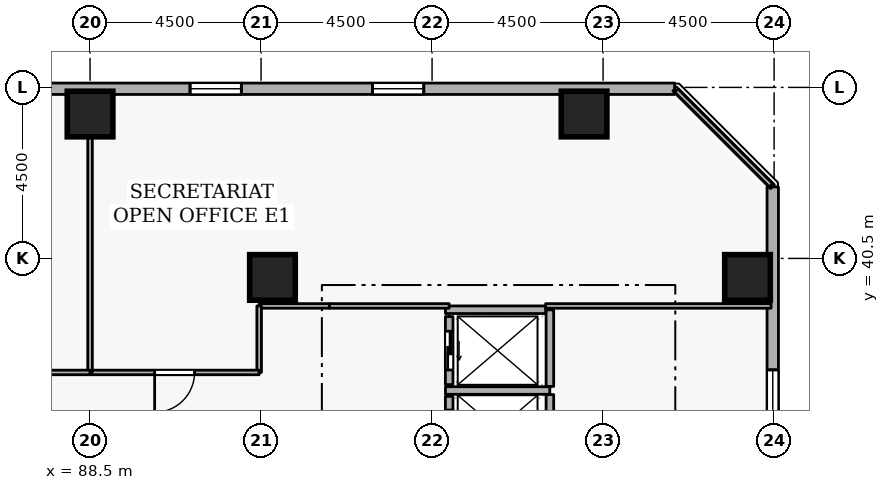
"""IFC4 building model, lengths in metres.
Left out: names, types, materials, properties, quantities, classifications, styles, units other than length and angle.
Written with IfcOpenShell. Run it as: python <this file> out.ifc"""

import sys

from ifc_helpers import new_model, si_unit, direction, frame, frame_2d, origin, origin_2d, place, context, subcontext, project, spatial, rectangle, extrude, element, fill, save


model = new_model("IFC4")
c1 = context("Model", 3, precision=1e-05, world=origin(), true_north=direction((0.0, 1.0)))
c2 = subcontext(c1, "Body", "Model", "MODEL_VIEW")
j1 = project(units=[si_unit("LENGTHUNIT", "METRE"), si_unit("PLANEANGLEUNIT", "RADIAN")], contexts=[c1])
p1 = place(None, origin())
s1 = spatial("IfcSite", under=j1, at=p1, CompositionType="ELEMENT")
p2 = place(p1, origin())
s2 = spatial("IfcBuilding", under=s1, at=p2, CompositionType="ELEMENT")
p3 = place(p2, frame((0.0, 0.0, 116.1)))
s3 = spatial("IfcBuildingStorey", under=s2, at=p3, CompositionType="ELEMENT", Elevation=116.1)
for number, where, z_axis, x_axis in (
    (1, (105.8, 40.0, 0.0), (0.0, 0.0, 1.0), (1.0, 0.0, 0.0)),
    (2, (101.5, 44.3, 0.0), (0.0, 0.0, 1.0), (1.0, 0.0, 0.0)),
    (3, (88.5, 44.3, 0.0), (0.0, 0.0, 1.0), (1.0, 0.0, 0.0)),
    (4, (93.3, 40.0, 0.0), (0.0, 0.0, 1.0), (1.0, 0.0, 0.0)),
):
    element("IfcColumn", number, at=place(p3, frame(where, z_axis=z_axis, x_axis=x_axis)), inside=s3, PredefinedType="COLUMN", context=c2, shape_type="SweptSolid", body=[
        extrude(rectangle(XDim=1.2, YDim=1.2, at=origin_2d()), origin(), (0.0, 0.0, 1.0), 3.6),
    ])
p4 = place(p3, frame((106.465, 5.619, 0.0), z_axis=(0.0, 0.0, 1.0), x_axis=(0.0, 1.0, 0.0)))
e5 = element("IfcWall", 5, at=p4, inside=s3, PredefinedType="STANDARD", context=c2, shape_type="SweptSolid", body=[
    extrude(rectangle(XDim=36.763, YDim=0.3, at=frame_2d((18.381, 0.0))), origin(), (0.0, 0.0, 1.0), 2.22),
])
p5 = place(p4, frame((1.8, 0.0, 0.72)))
e6 = element("IfcOpeningElement", 6, at=p5, cuts=e5, PredefinedType="OPENING", context=c2, shape_type="SweptSolid", body=[
    extrude(rectangle(XDim=1.35, YDim=1.05, at=frame_2d((0.675, 0.525))), frame((0.0, 0.16, 0.0), z_axis=(0.0, -1.0, 0.0), x_axis=(1.0, 0.0, 0.0)), (0.0, 0.0, 1.0), 0.32),
])
p6 = place(p4, frame((11.4, 0.0, 0.72)))
e7 = element("IfcOpeningElement", 7, at=p6, cuts=e5, PredefinedType="OPENING", context=c2, shape_type="SweptSolid", body=[
    extrude(rectangle(XDim=1.35, YDim=1.05, at=frame_2d((0.675, 0.525))), frame((0.0, 0.16, 0.0), z_axis=(0.0, -1.0, 0.0), x_axis=(1.0, 0.0, 0.0)), (0.0, 0.0, 1.0), 0.32),
])
p7 = place(p4, frame((16.2, 0.0, 0.72)))
e8 = element("IfcOpeningElement", 8, at=p7, cuts=e5, PredefinedType="OPENING", context=c2, shape_type="SweptSolid", body=[
    extrude(rectangle(XDim=1.35, YDim=1.05, at=frame_2d((0.675, 0.525))), frame((0.0, 0.16, 0.0), z_axis=(0.0, -1.0, 0.0), x_axis=(1.0, 0.0, 0.0)), (0.0, 0.0, 1.0), 0.32),
])
p8 = place(p4, frame((25.8, 0.0, 0.72)))
e9 = element("IfcOpeningElement", 9, at=p8, cuts=e5, PredefinedType="OPENING", context=c2, shape_type="SweptSolid", body=[
    extrude(rectangle(XDim=1.35, YDim=1.05, at=frame_2d((0.675, 0.525))), frame((0.0, 0.16, 0.0), z_axis=(0.0, -1.0, 0.0), x_axis=(1.0, 0.0, 0.0)), (0.0, 0.0, 1.0), 0.32),
])
p9 = place(p4, frame((30.6, 0.0, 0.72)))
e10 = element("IfcOpeningElement", 10, at=p9, cuts=e5, PredefinedType="OPENING", context=c2, shape_type="SweptSolid", body=[
    extrude(rectangle(XDim=1.35, YDim=1.05, at=frame_2d((0.675, 0.525))), frame((0.0, 0.16, 0.0), z_axis=(0.0, -1.0, 0.0), x_axis=(1.0, 0.0, 0.0)), (0.0, 0.0, 1.0), 0.32),
])
p10 = place(p3, frame((103.881, 44.965, 0.0), z_axis=(0.0, 0.0, 1.0), x_axis=(-1.0, 0.0, 0.0)))
e11 = element("IfcWall", 11, at=p10, inside=s3, PredefinedType="STANDARD", context=c2, shape_type="SweptSolid", body=[
    extrude(rectangle(XDim=36.763, YDim=0.3, at=frame_2d((18.381, 0.0))), origin(), (0.0, 0.0, 1.0), 2.22),
])
p11 = place(p10, frame((6.6, 0.0, 0.72)))
e12 = element("IfcOpeningElement", 12, at=p11, cuts=e11, PredefinedType="OPENING", context=c2, shape_type="SweptSolid", body=[
    extrude(rectangle(XDim=1.35, YDim=1.05, at=frame_2d((0.675, 0.525))), frame((0.0, 0.16, 0.0), z_axis=(0.0, -1.0, 0.0), x_axis=(1.0, 0.0, 0.0)), (0.0, 0.0, 1.0), 0.32),
])
p12 = place(p10, frame((11.4, 0.0, 0.72)))
e13 = element("IfcOpeningElement", 13, at=p12, cuts=e11, PredefinedType="OPENING", context=c2, shape_type="SweptSolid", body=[
    extrude(rectangle(XDim=1.35, YDim=1.05, at=frame_2d((0.675, 0.525))), frame((0.0, 0.16, 0.0), z_axis=(0.0, -1.0, 0.0), x_axis=(1.0, 0.0, 0.0)), (0.0, 0.0, 1.0), 0.32),
])
p13 = place(p10, frame((21.0, 0.0, 0.72)))
e14 = element("IfcOpeningElement", 14, at=p13, cuts=e11, PredefinedType="OPENING", context=c2, shape_type="SweptSolid", body=[
    extrude(rectangle(XDim=1.35, YDim=1.05, at=frame_2d((0.675, 0.525))), frame((0.0, 0.16, 0.0), z_axis=(0.0, -1.0, 0.0), x_axis=(1.0, 0.0, 0.0)), (0.0, 0.0, 1.0), 0.32),
])
p14 = place(p10, frame((25.8, 0.0, 0.72)))
e15 = element("IfcOpeningElement", 15, at=p14, cuts=e11, PredefinedType="OPENING", context=c2, shape_type="SweptSolid", body=[
    extrude(rectangle(XDim=1.35, YDim=1.05, at=frame_2d((0.675, 0.525))), frame((0.0, 0.16, 0.0), z_axis=(0.0, -1.0, 0.0), x_axis=(1.0, 0.0, 0.0)), (0.0, 0.0, 1.0), 0.32),
])
p15 = place(p3, frame((97.95, 36.87, 0.0), z_axis=(0.0, 0.0, 1.0), x_axis=(0.0, -1.0, 0.0)))
e16 = element("IfcWall", 16, at=p15, inside=s3, PredefinedType="STANDARD", context=c2, shape_type="SweptSolid", body=[
    extrude(rectangle(XDim=1.74, YDim=0.2, at=frame_2d((0.87, 0.0))), origin(), (0.0, 0.0, 1.0), 3.32),
])
p16 = place(p15, frame((0.36, 0.0, 0.0)))
e17 = element("IfcOpeningElement", 17, at=p16, cuts=e16, PredefinedType="OPENING", context=c2, shape_type="SweptSolid", body=[
    extrude(rectangle(XDim=1.02, YDim=2.06, at=frame_2d((0.51, 1.03))), frame((0.0, 0.11, 0.0), z_axis=(0.0, -1.0, 0.0), x_axis=(1.0, 0.0, 0.0)), (0.0, 0.0, 1.0), 0.22),
])
p17 = place(p3, frame((97.95, 38.97, 0.0), z_axis=(0.0, 0.0, 1.0), x_axis=(0.0, -1.0, 0.0)))
e18 = element("IfcWall", 18, at=p17, inside=s3, PredefinedType="STANDARD", context=c2, shape_type="SweptSolid", body=[
    extrude(rectangle(XDim=1.79, YDim=0.2, at=frame_2d((0.895, 0.0))), origin(), (0.0, 0.0, 1.0), 3.32),
])
p18 = place(p17, frame((0.385, 0.0, 0.0)))
e19 = element("IfcOpeningElement", 19, at=p18, cuts=e18, PredefinedType="OPENING", context=c2, shape_type="SweptSolid", body=[
    extrude(rectangle(XDim=1.02, YDim=2.06, at=frame_2d((0.51, 1.03))), frame((0.0, 0.11, 0.0), z_axis=(0.0, -1.0, 0.0), x_axis=(1.0, 0.0, 0.0)), (0.0, 0.0, 1.0), 0.22),
])
p19 = place(p3, frame((97.852, 37.025, 0.0), z_axis=(0.0, 0.0, 1.0), x_axis=(1.0, 0.0, 0.0)))
e20 = element("IfcWall", 20, at=p19, inside=s3, PredefinedType="STANDARD", context=c2, shape_type="SweptSolid", body=[
    extrude(rectangle(XDim=2.746, YDim=0.2, at=frame_2d((1.373, 0.0))), origin(), (0.0, 0.0, 1.0), 3.32),
])
p20 = place(p3, frame((100.6, 35.062, 0.0), z_axis=(0.0, 0.0, 1.0), x_axis=(0.0, 1.0, 0.0)))
e21 = element("IfcWall", 21, at=p20, inside=s3, PredefinedType="STANDARD", context=c2, shape_type="SweptSolid", body=[
    extrude(rectangle(XDim=1.856, YDim=0.2, at=frame_2d((0.928, 0.0))), origin(), (0.0, 0.0, 1.0), 3.32),
])
p21 = place(p3, frame((100.6, 37.132, 0.0), z_axis=(0.0, 0.0, 1.0), x_axis=(0.0, 1.0, 0.0)))
e22 = element("IfcWall", 22, at=p21, inside=s3, PredefinedType="STANDARD", context=c2, shape_type="SweptSolid", body=[
    extrude(rectangle(XDim=2.016, YDim=0.2, at=frame_2d((1.008, 0.0))), origin(), (0.0, 0.0, 1.0), 3.32),
])
p22 = place(p3, frame((97.852, 39.15, 0.0), z_axis=(0.0, 0.0, 1.0), x_axis=(1.0, 0.0, 0.0)))
e23 = element("IfcWall", 23, at=p22, inside=s3, PredefinedType="STANDARD", context=c2, shape_type="SweptSolid", body=[
    extrude(rectangle(XDim=2.636, YDim=0.2, at=frame_2d((1.318, 0.0))), origin(), (0.0, 0.0, 1.0), 3.32),
])
p23 = place(p3, frame((106.42, 39.25, 0.0), z_axis=(0.0, 0.0, 1.0), x_axis=(-1.0, 0.0, 0.0)))
e24 = element("IfcWall", 24, at=p23, inside=s3, PredefinedType="PARTITIONING", context=c2, shape_type="SweptSolid", body=[
    extrude(rectangle(XDim=5.932, YDim=0.12, at=frame_2d((2.966, 0.0))), origin(), (0.0, 0.0, 1.0), 3.32),
])
p24 = place(p3, frame((97.95, 39.25, 0.0), z_axis=(0.0, 0.0, 1.0), x_axis=(-1.0, 0.0, 0.0)))
e25 = element("IfcWall", 25, at=p24, inside=s3, PredefinedType="PARTITIONING", context=c2, shape_type="SweptSolid", body=[
    extrude(rectangle(XDim=3.15, YDim=0.12, at=frame_2d((1.575, 0.0))), origin(), (0.0, 0.0, 1.0), 3.32),
])
p25 = place(p3, frame((94.8, 39.25, 0.0), z_axis=(0.0, 0.0, 1.0), x_axis=(-1.0, 0.0, 0.0)))
e26 = element("IfcWall", 26, at=p25, inside=s3, PredefinedType="PARTITIONING", context=c2, shape_type="SweptSolid", body=[
    extrude(rectangle(XDim=1.85, YDim=0.12, at=frame_2d((0.925, 0.0))), origin(), (0.0, 0.0, 1.0), 3.32),
])
p26 = place(p3, frame((92.95, 39.25, 0.0), z_axis=(0.0, 0.0, 1.0), x_axis=(0.0, -1.0, 0.0)))
e27 = element("IfcWall", 27, at=p26, inside=s3, PredefinedType="PARTITIONING", context=c2, shape_type="SweptSolid", body=[
    extrude(rectangle(XDim=1.75, YDim=0.12, at=frame_2d((0.875, 0.0))), origin(), (0.0, 0.0, 1.0), 3.32),
])
p27 = place(p3, frame((92.95, 37.5, 0.0), z_axis=(0.0, 0.0, 1.0), x_axis=(-1.0, 0.0, 0.0)))
e28 = element("IfcWall", 28, at=p27, inside=s3, PredefinedType="PARTITIONING", context=c2, shape_type="SweptSolid", body=[
    extrude(rectangle(XDim=4.45, YDim=0.12, at=frame_2d((2.225, 0.0))), origin(), (0.0, 0.0, 1.0), 3.32),
])
p28 = place(p27, frame((1.7, 0.0, 0.0)))
e29 = element("IfcOpeningElement", 29, at=p28, cuts=e28, PredefinedType="OPENING", context=c2, shape_type="SweptSolid", body=[
    extrude(rectangle(XDim=1.05, YDim=2.1, at=frame_2d((0.525, 1.05))), frame((0.0, 0.07, 0.0), z_axis=(0.0, -1.0, 0.0), x_axis=(1.0, 0.0, 0.0)), (0.0, 0.0, 1.0), 0.14),
])
p29 = place(p3, frame((88.5, 37.5, 0.0), z_axis=(0.0, 0.0, 1.0), x_axis=(0.0, 1.0, 0.0)))
e30 = element("IfcWall", 30, at=p29, inside=s3, PredefinedType="PARTITIONING", context=c2, shape_type="SweptSolid", body=[
    extrude(rectangle(XDim=7.42, YDim=0.12, at=frame_2d((3.71, 0.0))), origin(), (0.0, 0.0, 1.0), 2.862),
])
p30 = place(p3, frame((103.925, 44.92, 0.0), z_axis=(0.0, 0.0, 1.0), x_axis=(0.707106781187, -0.707106781187, 0.0)))
e31 = element("IfcWall", 31, at=p30, inside=s3, PredefinedType="PARTITIONING", context=c2, shape_type="SweptSolid", body=[
    extrude(rectangle(XDim=3.528, YDim=0.12, at=frame_2d((1.764, 0.0))), origin(), (0.0, 0.0, 1.0), 3.32),
])
p31 = place(p3, frame((88.5, 37.5, 0.0), z_axis=(0.0, 0.0, 1.0), x_axis=(-1.0, 0.0, 0.0)))
e32 = element("IfcWall", 32, at=p31, inside=s3, PredefinedType="PARTITIONING", context=c2, shape_type="SweptSolid", body=[
    extrude(rectangle(XDim=3.15, YDim=0.12, at=frame_2d((1.575, 0.0))), origin(), (0.0, 0.0, 1.0), 3.32),
])
p32 = place(p31, frame((1.1, 0.0, 0.0)))
e33 = element("IfcOpeningElement", 33, at=p32, cuts=e32, PredefinedType="OPENING", context=c2, shape_type="SweptSolid", body=[
    extrude(rectangle(XDim=0.95, YDim=2.1, at=frame_2d((0.475, 1.05))), frame((0.0, 0.07, 0.0), z_axis=(0.0, -1.0, 0.0), x_axis=(1.0, 0.0, 0.0)), (0.0, 0.0, 1.0), 0.14),
])
p33 = place(p9, origin())
e34 = element("IfcWindow", 34, at=p33, inside=s3, PartitioningType="SINGLE_PANEL", PredefinedType="WINDOW", context=c2, shape_type="SweptSolid", body=[
    extrude(rectangle(XDim=1.35, YDim=1.05, at=frame_2d((0.675, 0.525))), frame((0.0, 0.03, 0.0), z_axis=(0.0, -1.0, 0.0), x_axis=(1.0, 0.0, 0.0)), (0.0, 0.0, 1.0), 0.06),
])
fill(e10, e34)
p34 = place(p11, origin())
e35 = element("IfcWindow", 35, at=p34, inside=s3, PartitioningType="SINGLE_PANEL", PredefinedType="WINDOW", context=c2, shape_type="SweptSolid", body=[
    extrude(rectangle(XDim=1.35, YDim=1.05, at=frame_2d((0.675, 0.525))), frame((0.0, 0.03, 0.0), z_axis=(0.0, -1.0, 0.0), x_axis=(1.0, 0.0, 0.0)), (0.0, 0.0, 1.0), 0.06),
])
fill(e12, e35)
p35 = place(p12, origin())
e36 = element("IfcWindow", 36, at=p35, inside=s3, PartitioningType="SINGLE_PANEL", PredefinedType="WINDOW", context=c2, shape_type="SweptSolid", body=[
    extrude(rectangle(XDim=1.35, YDim=1.05, at=frame_2d((0.675, 0.525))), frame((0.0, 0.03, 0.0), z_axis=(0.0, -1.0, 0.0), x_axis=(1.0, 0.0, 0.0)), (0.0, 0.0, 1.0), 0.06),
])
fill(e13, e36)
p36 = place(p16, origin())
e37 = element("IfcDoor", 37, at=p36, inside=s3, OperationType="SLIDING_TO_LEFT", PredefinedType="DOOR", context=c2, shape_type="SweptSolid", body=[
    extrude(rectangle(XDim=1.02, YDim=2.06, at=frame_2d((0.51, 1.03))), frame((0.0, 0.025, 0.0), z_axis=(0.0, -1.0, 0.0), x_axis=(1.0, 0.0, 0.0)), (0.0, 0.0, 1.0), 0.05),
])
fill(e17, e37)
p37 = place(p18, origin())
e38 = element("IfcDoor", 38, at=p37, inside=s3, OperationType="SLIDING_TO_LEFT", PredefinedType="DOOR", context=c2, shape_type="SweptSolid", body=[
    extrude(rectangle(XDim=1.02, YDim=2.06, at=frame_2d((0.51, 1.03))), frame((0.0, 0.025, 0.0), z_axis=(0.0, -1.0, 0.0), x_axis=(1.0, 0.0, 0.0)), (0.0, 0.0, 1.0), 0.05),
])
fill(e19, e38)
p38 = place(p28, origin())
e39 = element("IfcDoor", 39, at=p38, inside=s3, OperationType="SINGLE_SWING_RIGHT", PredefinedType="DOOR", context=c2, shape_type="SweptSolid", body=[
    extrude(rectangle(XDim=1.05, YDim=2.1, at=frame_2d((0.525, 1.05))), frame((0.0, 0.025, 0.0), z_axis=(0.0, -1.0, 0.0), x_axis=(1.0, 0.0, 0.0)), (0.0, 0.0, 1.0), 0.05),
])
fill(e29, e39)
save(model, sys.argv[1])
